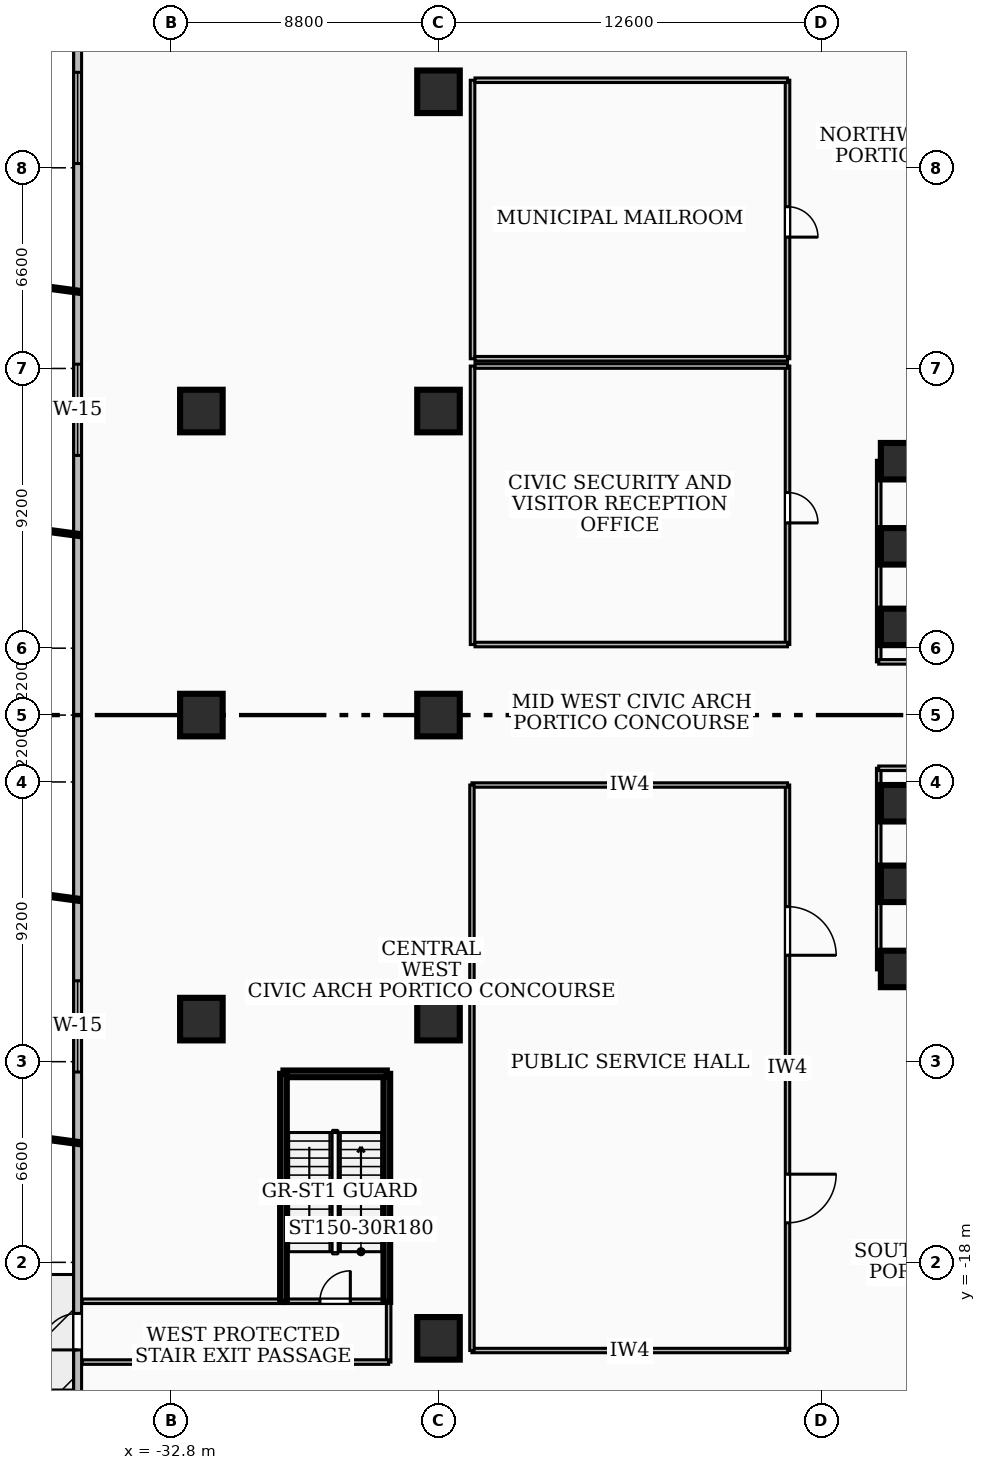
"""IFC4 building model, lengths in metres.
Left out: names, types, materials, properties, quantities, classifications, styles, units other than length and angle.
Written with IfcOpenShell. Run it as: python <this file> out.ifc"""

import sys

from ifc_helpers import new_model, si_unit, direction, frame, frame_2d, origin, origin_2d, place, context, subcontext, project, spatial, rectangle, extrude, element, fill, save


model = new_model("IFC4")
c1 = context("Model", 3, precision=1e-05, world=origin(), true_north=direction((0.0, 1.0)))
c2 = subcontext(c1, "Body", "Model", "MODEL_VIEW")
j1 = project(units=[si_unit("LENGTHUNIT", "METRE"), si_unit("PLANEANGLEUNIT", "RADIAN")], contexts=[c1])
p1 = place(None, origin())
s1 = spatial("IfcSite", under=j1, at=p1, CompositionType="ELEMENT")
p2 = place(p1, origin())
s2 = spatial("IfcBuilding", under=s1, at=p2, CompositionType="ELEMENT")
p3 = place(p2, origin())
s3 = spatial("IfcBuildingStorey", under=s2, at=p3, CompositionType="ELEMENT", Elevation=0.0)
p4 = place(p3, frame((-8.78, 8.585, 0.0), z_axis=(0.0, 0.0, 1.0), x_axis=(1.0, 0.0, 0.0)))
e1 = element("IfcWall", 1, at=p4, inside=s3, PredefinedType="SHEAR", context=c2, shape_type="SweptSolid", body=[
    extrude(rectangle(XDim=17.56, YDim=0.55, at=frame_2d((8.78, 0.0))), origin(), (0.0, 0.0, 1.0), 5.08),
])
p5 = place(p4, frame((7.29, 0.0, 0.0)))
e2 = element("IfcOpeningElement", 2, at=p5, cuts=e1, PredefinedType="OPENING", context=c2, shape_type="SweptSolid", body=[
    extrude(rectangle(XDim=1.1, YDim=2.15, at=frame_2d((0.55, 1.075))), frame((0.0, 0.285, 0.0), z_axis=(0.0, -1.0, 0.0), x_axis=(1.0, 0.0, 0.0)), (0.0, 0.0, 1.0), 0.57),
])
p6 = place(p3, frame((8.78, -8.585, 0.0), z_axis=(0.0, 0.0, 1.0), x_axis=(-1.0, 0.0, 0.0)))
e3 = element("IfcWall", 3, at=p6, inside=s3, PredefinedType="SHEAR", context=c2, shape_type="SweptSolid", body=[
    extrude(rectangle(XDim=17.56, YDim=0.55, at=frame_2d((8.78, 0.0))), origin(), (0.0, 0.0, 1.0), 5.08),
])
p7 = place(p6, frame((7.29, 0.0, 0.0)))
e4 = element("IfcOpeningElement", 4, at=p7, cuts=e3, PredefinedType="OPENING", context=c2, shape_type="SweptSolid", body=[
    extrude(rectangle(XDim=1.1, YDim=2.15, at=frame_2d((0.55, 1.075))), frame((0.0, 0.285, 0.0), z_axis=(0.0, -1.0, 0.0), x_axis=(1.0, 0.0, 0.0)), (0.0, 0.0, 1.0), 0.57),
])
for number, where, z_axis, x_axis in (
    (5, (-29.1, -19.3, 0.0), (0.0, 0.0, 1.0), (0.0, 1.0, 0.0)),
    (6, (-25.7, -19.3, 0.0), (0.0, 0.0, 1.0), (0.0, 1.0, 0.0)),
):
    element("IfcWall", number, at=place(p3, frame(where, z_axis=z_axis, x_axis=x_axis)), inside=s3, PredefinedType="SOLIDWALL", context=c2, shape_type="SweptSolid", body=[
        extrude(rectangle(XDim=7.5, YDim=0.22, at=frame_2d((3.75, 0.0))), origin(), (0.0, 0.0, 1.0), 5.08),
    ])
p8 = place(p3, frame((-29.1, -11.8, 0.0), z_axis=(0.0, 0.0, 1.0), x_axis=(1.0, 0.0, 0.0)))
e7 = element("IfcWall", 7, at=p8, inside=s3, PredefinedType="SOLIDWALL", context=c2, shape_type="SweptSolid", body=[
    extrude(rectangle(XDim=3.4, YDim=0.22, at=frame_2d((1.7, 0.0))), origin(), (0.0, 0.0, 1.0), 5.08),
])
for number, where, z_axis, x_axis in (
    (8, (-8.85, -5.55, 0.0), (0.0, 0.0, 1.0), (1.0, 0.0, 0.0)),
    (9, (-8.85, -2.9, 0.0), (0.0, 0.0, 1.0), (1.0, 0.0, 0.0)),
    (10, (-8.85, 2.9, 0.0), (0.0, 0.0, 1.0), (1.0, 0.0, 0.0)),
    (11, (-8.85, 5.55, 0.0), (0.0, 0.0, 1.0), (1.0, 0.0, 0.0)),
    (12, (-8.85, 8.35, 0.0), (0.0, 0.0, 1.0), (1.0, 0.0, 0.0)),
    (13, (-8.85, -8.35, 0.0), (0.0, 0.0, 1.0), (1.0, 0.0, 0.0)),
):
    element("IfcColumn", number, at=place(p3, frame(where, z_axis=z_axis, x_axis=x_axis)), inside=s3, PredefinedType="COLUMN", context=c2, shape_type="SweptSolid", body=[
        extrude(rectangle(XDim=1.2, YDim=1.2, at=origin_2d()), origin(), (0.0, 0.0, 1.0), 5.4),
    ])
for number, where, z_axis, x_axis in (
    (14, (-31.8, -10.0, 0.0), (0.0, 0.0, 1.0), (1.0, 0.0, 0.0)),
    (15, (-31.8, 0.0, 0.0), (0.0, 0.0, 1.0), (1.0, 0.0, 0.0)),
    (16, (-31.8, 10.0, 0.0), (0.0, 0.0, 1.0), (1.0, 0.0, 0.0)),
    (17, (-24.0, -10.0, 0.0), (0.0, 0.0, 1.0), (1.0, 0.0, 0.0)),
    (18, (-24.0, 0.0, 0.0), (0.0, 0.0, 1.0), (1.0, 0.0, 0.0)),
    (19, (-24.0, 10.0, 0.0), (0.0, 0.0, 1.0), (1.0, 0.0, 0.0)),
    (20, (-24.0, -20.5, 0.0), (0.0, 0.0, 1.0), (1.0, 0.0, 0.0)),
    (21, (-24.0, 20.5, 0.0), (0.0, 0.0, 1.0), (1.0, 0.0, 0.0)),
):
    element("IfcColumn", number, at=place(p3, frame(where, z_axis=z_axis, x_axis=x_axis)), inside=s3, PredefinedType="COLUMN", context=c2, shape_type="SweptSolid", body=[
        extrude(rectangle(XDim=1.4, YDim=1.4, at=origin_2d()), origin(), (0.0, 0.0, 1.0), 5.4),
    ])
p9 = place(p3, frame((-35.87, -27.34, 0.0), z_axis=(0.0, 0.0, 1.0), x_axis=(0.0, 1.0, 0.0)))
e22 = element("IfcWall", 22, at=p9, inside=s3, PredefinedType="SOLIDWALL", context=c2, shape_type="SweptSolid", body=[
    extrude(rectangle(XDim=54.68, YDim=0.26, at=frame_2d((27.34, 0.0))), origin(), (0.0, 0.0, 1.0), 5.08),
])
p10 = place(p9, frame((6.46, 0.0, 0.0)))
e23 = element("IfcOpeningElement", 23, at=p10, cuts=e22, PredefinedType="OPENING", context=c2, shape_type="SweptSolid", body=[
    extrude(rectangle(XDim=1.2, YDim=2.15, at=frame_2d((0.6, 1.075))), frame((0.0, 0.14, 0.0), z_axis=(0.0, -1.0, 0.0), x_axis=(1.0, 0.0, 0.0)), (0.0, 0.0, 1.0), 0.28),
])
p11 = place(p9, frame((15.6, 0.0, 0.9)))
e24 = element("IfcOpeningElement", 24, at=p11, cuts=e22, PredefinedType="OPENING", context=c2, shape_type="SweptSolid", body=[
    extrude(rectangle(XDim=3.0, YDim=2.4, at=frame_2d((1.5, 1.2))), frame((0.0, 0.14, 0.0), z_axis=(0.0, -1.0, 0.0), x_axis=(1.0, 0.0, 0.0)), (0.0, 0.0, 1.0), 0.28),
])
p12 = place(p9, frame((35.88, 0.0, 0.9)))
e25 = element("IfcOpeningElement", 25, at=p12, cuts=e22, PredefinedType="OPENING", context=c2, shape_type="SweptSolid", body=[
    extrude(rectangle(XDim=3.0, YDim=2.4, at=frame_2d((1.5, 1.2))), frame((0.0, 0.14, 0.0), z_axis=(0.0, -1.0, 0.0), x_axis=(1.0, 0.0, 0.0)), (0.0, 0.0, 1.0), 0.28),
])
p13 = place(p9, frame((45.48, 0.0, 0.9)))
e26 = element("IfcOpeningElement", 26, at=p13, cuts=e22, PredefinedType="OPENING", context=c2, shape_type="SweptSolid", body=[
    extrude(rectangle(XDim=3.0, YDim=2.4, at=frame_2d((1.5, 1.2))), frame((0.0, 0.14, 0.0), z_axis=(0.0, -1.0, 0.0), x_axis=(1.0, 0.0, 0.0)), (0.0, 0.0, 1.0), 0.28),
])
p14 = place(p3, frame((-29.08, -19.28, 0.0), z_axis=(0.0, 0.0, 1.0), x_axis=(1.0, 0.0, 0.0)))
e27 = element("IfcWall", 27, at=p14, inside=s3, PredefinedType="PARTITIONING", context=c2, shape_type="SweptSolid", body=[
    extrude(rectangle(XDim=3.36, YDim=0.15, at=frame_2d((1.68, 0.0))), origin(), (0.0, 0.0, 1.0), 5.08),
])
p15 = place(p14, frame((1.18, 0.0, 0.0)))
e28 = element("IfcOpeningElement", 28, at=p15, cuts=e27, PredefinedType="OPENING", context=c2, shape_type="SweptSolid", body=[
    extrude(rectangle(XDim=1.0, YDim=2.1, at=frame_2d((0.5, 1.05))), frame((0.0, 0.085, 0.0), z_axis=(0.0, -1.0, 0.0), x_axis=(1.0, 0.0, 0.0)), (0.0, 0.0, 1.0), 0.17),
])
p16 = place(p3, frame((-9.52, 1.75, 0.0), z_axis=(0.0, 0.0, 1.0), x_axis=(0.0, 1.0, 0.0)))
e29 = element("IfcWall", 29, at=p16, inside=s3, PredefinedType="PARTITIONING", context=c2, shape_type="SweptSolid", body=[
    extrude(rectangle(XDim=6.63, YDim=0.15, at=frame_2d((3.315, 0.0))), origin(), (0.0, 0.0, 1.0), 4.09),
])
p17 = place(p3, frame((-7.85, 1.75, 0.0), z_axis=(0.0, 0.0, 1.0), x_axis=(-1.0, 0.0, 0.0)))
e30 = element("IfcWall", 30, at=p17, inside=s3, PredefinedType="PARTITIONING", context=c2, shape_type="SweptSolid", body=[
    extrude(rectangle(XDim=1.67, YDim=0.15, at=frame_2d((0.835, 0.0))), origin(), (0.0, 0.0, 1.0), 4.145),
])
p18 = place(p3, frame((-9.52, -8.38, 0.0), z_axis=(0.0, 0.0, 1.0), x_axis=(0.0, 1.0, 0.0)))
e31 = element("IfcWall", 31, at=p18, inside=s3, PredefinedType="PARTITIONING", context=c2, shape_type="SweptSolid", body=[
    extrude(rectangle(XDim=6.63, YDim=0.15, at=frame_2d((3.315, 0.0))), origin(), (0.0, 0.0, 1.0), 4.09),
])
p19 = place(p3, frame((-7.85, -1.75, 0.0), z_axis=(0.0, 0.0, 1.0), x_axis=(-1.0, 0.0, 0.0)))
e32 = element("IfcWall", 32, at=p19, inside=s3, PredefinedType="PARTITIONING", context=c2, shape_type="SweptSolid", body=[
    extrude(rectangle(XDim=1.67, YDim=0.15, at=frame_2d((0.835, 0.0))), origin(), (0.0, 0.0, 1.0), 4.145),
])
p20 = place(p3, frame((-35.72, -21.28, 0.0), z_axis=(0.0, 0.0, 1.0), x_axis=(1.0, 0.0, 0.0)))
e33 = element("IfcWall", 33, at=p20, inside=s3, PredefinedType="PARTITIONING", context=c2, shape_type="SweptSolid", body=[
    extrude(rectangle(XDim=10.08, YDim=0.15, at=frame_2d((5.04, 0.0))), origin(), (0.0, 0.0, 1.0), 4.46),
])
p21 = place(p3, frame((-35.72, -19.28, 0.0), z_axis=(0.0, 0.0, 1.0), x_axis=(1.0, 0.0, 0.0)))
e34 = element("IfcWall", 34, at=p21, inside=s3, PredefinedType="PARTITIONING", context=c2, shape_type="SweptSolid", body=[
    extrude(rectangle(XDim=6.64, YDim=0.15, at=frame_2d((3.32, 0.0))), origin(), (0.0, 0.0, 1.0), 4.46),
])
p22 = place(p3, frame((-25.64, -21.28, 0.0), z_axis=(0.0, 0.0, 1.0), x_axis=(0.0, 1.0, 0.0)))
e35 = element("IfcWall", 35, at=p22, inside=s3, PredefinedType="PARTITIONING", context=c2, shape_type="SweptSolid", body=[
    extrude(rectangle(XDim=2.0, YDim=0.15, at=frame_2d((1.0, 0.0))), origin(), (0.0, 0.0, 1.0), 5.08),
])
p23 = place(p3, frame((-12.52, -2.3, 0.0), z_axis=(0.0, 0.0, 1.0), x_axis=(0.0, -1.0, 0.0)))
e36 = element("IfcWall", 36, at=p23, inside=s3, PredefinedType="PARTITIONING", context=c2, shape_type="SweptSolid", body=[
    extrude(rectangle(XDim=18.6, YDim=0.145, at=frame_2d((9.3, 0.0))), origin(), (0.0, 0.0, 1.0), 4.09),
])
p24 = place(p23, frame((12.8, 0.0, 0.0)))
e37 = element("IfcOpeningElement", 37, at=p24, cuts=e36, PredefinedType="OPENING", context=c2, shape_type="SweptSolid", body=[
    extrude(rectangle(XDim=1.6, YDim=2.15, at=frame_2d((0.8, 1.075))), frame((0.0, 0.083, 0.0), z_axis=(0.0, -1.0, 0.0), x_axis=(1.0, 0.0, 0.0)), (0.0, 0.0, 1.0), 0.165),
])
p25 = place(p23, frame((4.0, 0.0, 0.0)))
e38 = element("IfcOpeningElement", 38, at=p25, cuts=e36, PredefinedType="OPENING", context=c2, shape_type="SweptSolid", body=[
    extrude(rectangle(XDim=1.6, YDim=2.15, at=frame_2d((0.8, 1.075))), frame((0.0, 0.083, 0.0), z_axis=(0.0, -1.0, 0.0), x_axis=(1.0, 0.0, 0.0)), (0.0, 0.0, 1.0), 0.165),
])
p26 = place(p3, frame((-22.9, -2.3, 0.0), z_axis=(0.0, 0.0, 1.0), x_axis=(1.0, 0.0, 0.0)))
e39 = element("IfcWall", 39, at=p26, inside=s3, PredefinedType="PARTITIONING", context=c2, shape_type="SweptSolid", body=[
    extrude(rectangle(XDim=10.38, YDim=0.145, at=frame_2d((5.19, 0.0))), origin(), (0.0, 0.0, 1.0), 4.09),
])
p27 = place(p3, frame((-22.9, -20.9, 0.0), z_axis=(0.0, 0.0, 1.0), x_axis=(0.0, 1.0, 0.0)))
e40 = element("IfcWall", 40, at=p27, inside=s3, PredefinedType="PARTITIONING", context=c2, shape_type="SweptSolid", body=[
    extrude(rectangle(XDim=18.6, YDim=0.145, at=frame_2d((9.3, 0.0))), origin(), (0.0, 0.0, 1.0), 4.09),
])
p28 = place(p3, frame((-22.9, -20.9, 0.0), z_axis=(0.0, 0.0, 1.0), x_axis=(1.0, 0.0, 0.0)))
e41 = element("IfcWall", 41, at=p28, inside=s3, PredefinedType="PARTITIONING", context=c2, shape_type="SweptSolid", body=[
    extrude(rectangle(XDim=10.38, YDim=0.145, at=frame_2d((5.19, 0.0))), origin(), (0.0, 0.0, 1.0), 5.08),
])
p29 = place(p3, frame((-12.52, 11.48, 0.0), z_axis=(0.0, 0.0, 1.0), x_axis=(0.0, -1.0, 0.0)))
e42 = element("IfcWall", 42, at=p29, inside=s3, PredefinedType="PARTITIONING", context=c2, shape_type="SweptSolid", body=[
    extrude(rectangle(XDim=9.16, YDim=0.15, at=frame_2d((4.58, 0.0))), origin(), (0.0, 0.0, 1.0), 4.09),
])
p30 = place(p29, frame((4.16, 0.0, 0.0)))
e43 = element("IfcOpeningElement", 43, at=p30, cuts=e42, PredefinedType="OPENING", context=c2, shape_type="SweptSolid", body=[
    extrude(rectangle(XDim=1.0, YDim=2.1, at=frame_2d((0.5, 1.05))), frame((0.0, 0.085, 0.0), z_axis=(0.0, -1.0, 0.0), x_axis=(1.0, 0.0, 0.0)), (0.0, 0.0, 1.0), 0.17),
])
for number, where, z_axis, x_axis in (
    (44, (-22.8, 2.32, 0.0), (0.0, 0.0, 1.0), (1.0, 0.0, 0.0)),
    (45, (-22.8, 11.48, 0.0), (0.0, 0.0, 1.0), (1.0, 0.0, 0.0)),
):
    element("IfcWall", number, at=place(p3, frame(where, z_axis=z_axis, x_axis=x_axis)), inside=s3, PredefinedType="PARTITIONING", context=c2, shape_type="SweptSolid", body=[
        extrude(rectangle(XDim=10.28, YDim=0.15, at=frame_2d((5.14, 0.0))), origin(), (0.0, 0.0, 1.0), 5.08),
    ])
p31 = place(p3, frame((-22.88, 2.32, 0.0), z_axis=(0.0, 0.0, 1.0), x_axis=(0.0, 1.0, 0.0)))
e46 = element("IfcWall", 46, at=p31, inside=s3, PredefinedType="PARTITIONING", context=c2, shape_type="SweptSolid", body=[
    extrude(rectangle(XDim=9.16, YDim=0.15, at=frame_2d((4.58, 0.0))), origin(), (0.0, 0.0, 1.0), 4.09),
])
p32 = place(p3, frame((-12.52, 20.88, 0.0), z_axis=(0.0, 0.0, 1.0), x_axis=(0.0, -1.0, 0.0)))
e47 = element("IfcWall", 47, at=p32, inside=s3, PredefinedType="PARTITIONING", context=c2, shape_type="SweptSolid", body=[
    extrude(rectangle(XDim=9.16, YDim=0.15, at=frame_2d((4.58, 0.0))), origin(), (0.0, 0.0, 1.0), 4.09),
])
p33 = place(p32, frame((4.16, 0.0, 0.0)))
e48 = element("IfcOpeningElement", 48, at=p33, cuts=e47, PredefinedType="OPENING", context=c2, shape_type="SweptSolid", body=[
    extrude(rectangle(XDim=1.0, YDim=2.1, at=frame_2d((0.5, 1.05))), frame((0.0, 0.085, 0.0), z_axis=(0.0, -1.0, 0.0), x_axis=(1.0, 0.0, 0.0)), (0.0, 0.0, 1.0), 0.17),
])
for number, where, z_axis, x_axis in (
    (49, (-22.8, 11.72, 0.0), (0.0, 0.0, 1.0), (1.0, 0.0, 0.0)),
    (50, (-22.8, 20.88, 0.0), (0.0, 0.0, 1.0), (1.0, 0.0, 0.0)),
):
    element("IfcWall", number, at=place(p3, frame(where, z_axis=z_axis, x_axis=x_axis)), inside=s3, PredefinedType="PARTITIONING", context=c2, shape_type="SweptSolid", body=[
        extrude(rectangle(XDim=10.28, YDim=0.15, at=frame_2d((5.14, 0.0))), origin(), (0.0, 0.0, 1.0), 5.08),
    ])
p34 = place(p3, frame((-22.88, 11.72, 0.0), z_axis=(0.0, 0.0, 1.0), x_axis=(0.0, 1.0, 0.0)))
e51 = element("IfcWall", 51, at=p34, inside=s3, PredefinedType="PARTITIONING", context=c2, shape_type="SweptSolid", body=[
    extrude(rectangle(XDim=9.16, YDim=0.15, at=frame_2d((4.58, 0.0))), origin(), (0.0, 0.0, 1.0), 4.09),
])
p35 = place(p10, origin())
e52 = element("IfcDoor", 52, at=p35, inside=s3, OperationType="SINGLE_SWING_LEFT", PredefinedType="DOOR", context=c2, shape_type="SweptSolid", body=[
    extrude(rectangle(XDim=1.2, YDim=2.15, at=frame_2d((0.6, 1.075))), frame((0.0, 0.025, 0.0), z_axis=(0.0, -1.0, 0.0), x_axis=(1.0, 0.0, 0.0)), (0.0, 0.0, 1.0), 0.05),
])
fill(e23, e52)
p36 = place(p11, origin())
e53 = element("IfcWindow", 53, at=p36, inside=s3, PartitioningType="SINGLE_PANEL", PredefinedType="WINDOW", context=c2, shape_type="SweptSolid", body=[
    extrude(rectangle(XDim=3.0, YDim=2.4, at=frame_2d((1.5, 1.2))), frame((0.0, 0.03, 0.0), z_axis=(0.0, -1.0, 0.0), x_axis=(1.0, 0.0, 0.0)), (0.0, 0.0, 1.0), 0.06),
])
fill(e24, e53)
p37 = place(p12, origin())
e54 = element("IfcWindow", 54, at=p37, inside=s3, PartitioningType="SINGLE_PANEL", PredefinedType="WINDOW", context=c2, shape_type="SweptSolid", body=[
    extrude(rectangle(XDim=3.0, YDim=2.4, at=frame_2d((1.5, 1.2))), frame((0.0, 0.03, 0.0), z_axis=(0.0, -1.0, 0.0), x_axis=(1.0, 0.0, 0.0)), (0.0, 0.0, 1.0), 0.06),
])
fill(e25, e54)
p38 = place(p13, origin())
e55 = element("IfcWindow", 55, at=p38, inside=s3, PartitioningType="SINGLE_PANEL", PredefinedType="WINDOW", context=c2, shape_type="SweptSolid", body=[
    extrude(rectangle(XDim=3.0, YDim=2.4, at=frame_2d((1.5, 1.2))), frame((0.0, 0.03, 0.0), z_axis=(0.0, -1.0, 0.0), x_axis=(1.0, 0.0, 0.0)), (0.0, 0.0, 1.0), 0.06),
])
fill(e26, e55)
p39 = place(p15, origin())
e56 = element("IfcDoor", 56, at=p39, inside=s3, OperationType="SINGLE_SWING_RIGHT", PredefinedType="DOOR", context=c2, shape_type="SweptSolid", body=[
    extrude(rectangle(XDim=1.0, YDim=2.1, at=frame_2d((0.5, 1.05))), frame((0.0, 0.025, 0.0), z_axis=(0.0, -1.0, 0.0), x_axis=(1.0, 0.0, 0.0)), (0.0, 0.0, 1.0), 0.05),
])
fill(e28, e56)
p40 = place(p24, origin())
e57 = element("IfcDoor", 57, at=p40, inside=s3, OperationType="SINGLE_SWING_LEFT", PredefinedType="DOOR", context=c2, shape_type="SweptSolid", body=[
    extrude(rectangle(XDim=1.6, YDim=2.15, at=frame_2d((0.8, 1.075))), frame((0.0, 0.025, 0.0), z_axis=(0.0, -1.0, 0.0), x_axis=(1.0, 0.0, 0.0)), (0.0, 0.0, 1.0), 0.05),
])
fill(e37, e57)
p41 = place(p25, origin())
e58 = element("IfcDoor", 58, at=p41, inside=s3, OperationType="SINGLE_SWING_RIGHT", PredefinedType="DOOR", context=c2, shape_type="SweptSolid", body=[
    extrude(rectangle(XDim=1.6, YDim=2.15, at=frame_2d((0.8, 1.075))), frame((0.0, 0.025, 0.0), z_axis=(0.0, -1.0, 0.0), x_axis=(1.0, 0.0, 0.0)), (0.0, 0.0, 1.0), 0.05),
])
fill(e38, e58)
p42 = place(p30, origin())
e59 = element("IfcDoor", 59, at=p42, inside=s3, OperationType="SINGLE_SWING_RIGHT", PredefinedType="DOOR", context=c2, shape_type="SweptSolid", body=[
    extrude(rectangle(XDim=1.0, YDim=2.1, at=frame_2d((0.5, 1.05))), frame((0.0, 0.025, 0.0), z_axis=(0.0, -1.0, 0.0), x_axis=(1.0, 0.0, 0.0)), (0.0, 0.0, 1.0), 0.05),
])
fill(e43, e59)
p43 = place(p33, origin())
e60 = element("IfcDoor", 60, at=p43, inside=s3, OperationType="SINGLE_SWING_RIGHT", PredefinedType="DOOR", context=c2, shape_type="SweptSolid", body=[
    extrude(rectangle(XDim=1.0, YDim=2.1, at=frame_2d((0.5, 1.05))), frame((0.0, 0.025, 0.0), z_axis=(0.0, -1.0, 0.0), x_axis=(1.0, 0.0, 0.0)), (0.0, 0.0, 1.0), 0.05),
])
fill(e48, e60)
save(model, sys.argv[1])
